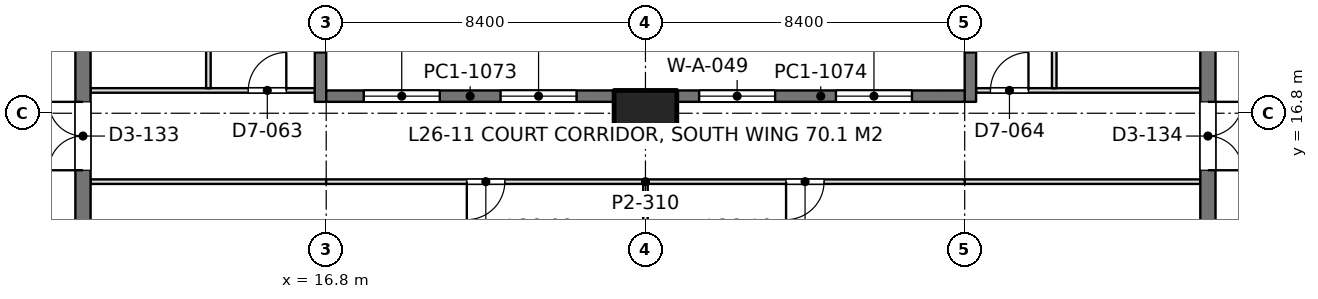
"""IFC4 building model, lengths in metres.
Left out: names, types, materials, properties, quantities, classifications, styles, units other than length and angle.
Written with IfcOpenShell. Run it as: python <this file> out.ifc"""

import sys

from ifc_helpers import new_model, si_unit, direction, frame, frame_2d, origin, origin_2d, place, context, subcontext, project, spatial, rectangle, extrude, element, fill, save


model = new_model("IFC4")
c1 = context("Model", 3, precision=1e-05, world=origin(), true_north=direction((0.0, 1.0)))
c2 = subcontext(c1, "Body", "Model", "MODEL_VIEW")
j1 = project(units=[si_unit("LENGTHUNIT", "METRE"), si_unit("PLANEANGLEUNIT", "RADIAN")], contexts=[c1])
p1 = place(None, origin())
s1 = spatial("IfcSite", under=j1, at=p1, CompositionType="ELEMENT")
p2 = place(p1, origin())
s2 = spatial("IfcBuilding", under=s1, at=p2, CompositionType="ELEMENT")
p3 = place(p2, frame((0.0, 0.0, 117.6)))
s3 = spatial("IfcBuildingStorey", under=s2, at=p3, CompositionType="ELEMENT", Elevation=117.6)
p4 = place(p3, frame((25.2, 16.8, 0.0), z_axis=(0.0, 0.0, 1.0), x_axis=(1.0, 0.0, 0.0)))
e1 = element("IfcColumn", 1, at=p4, inside=s3, PredefinedType="COLUMN", context=c2, shape_type="SweptSolid", body=[
    extrude(rectangle(XDim=1.65, YDim=1.2, at=origin_2d()), origin(), (0.0, 0.0, 1.0), 4.2),
])
p5 = place(p3, frame((10.4, 13.05, 0.0), z_axis=(0.0, 0.0, 1.0), x_axis=(0.0, 1.0, 0.0)))
e2 = element("IfcWall", 2, at=p5, inside=s3, PredefinedType="SHEAR", context=c2, shape_type="SweptSolid", body=[
    extrude(rectangle(XDim=24.3, YDim=0.4, at=frame_2d((12.15, 0.0))), origin(), (0.0, 0.0, 1.0), 4.2),
])
p6 = place(p5, frame((10.05, 0.0, 0.0)))
e3 = element("IfcOpeningElement", 3, at=p6, cuts=e2, PredefinedType="OPENING", context=c2, shape_type="SweptSolid", body=[
    extrude(rectangle(XDim=1.1, YDim=2.2, at=frame_2d((0.55, 1.1))), frame((0.0, 0.21, 0.0), z_axis=(0.0, -1.0, 0.0), x_axis=(1.0, 0.0, 0.0)), (0.0, 0.0, 1.0), 0.42),
])
p7 = place(p5, frame((12.9, 0.0, 0.0)))
e4 = element("IfcOpeningElement", 4, at=p7, cuts=e2, PredefinedType="OPENING", context=c2, shape_type="SweptSolid", body=[
    extrude(rectangle(XDim=1.1, YDim=2.2, at=frame_2d((0.55, 1.1))), frame((0.0, 0.21, 0.0), z_axis=(0.0, -1.0, 0.0), x_axis=(1.0, 0.0, 0.0)), (0.0, 0.0, 1.0), 0.42),
])
p8 = place(p5, frame((21.45, 0.0, 0.0)))
e5 = element("IfcOpeningElement", 5, at=p8, cuts=e2, PredefinedType="OPENING", context=c2, shape_type="SweptSolid", body=[
    extrude(rectangle(XDim=1.1, YDim=2.2, at=frame_2d((0.55, 1.1))), frame((0.0, 0.21, 0.0), z_axis=(0.0, -1.0, 0.0), x_axis=(1.0, 0.0, 0.0)), (0.0, 0.0, 1.0), 0.42),
])
p9 = place(p5, frame((2.25, 0.0, 0.0)))
e6 = element("IfcOpeningElement", 6, at=p9, cuts=e2, PredefinedType="OPENING", context=c2, shape_type="SweptSolid", body=[
    extrude(rectangle(XDim=1.8, YDim=2.4, at=frame_2d((0.9, 1.2))), frame((0.0, 0.21, 0.0), z_axis=(0.0, -1.0, 0.0), x_axis=(1.0, 0.0, 0.0)), (0.0, 0.0, 1.0), 0.42),
])
p10 = place(p5, frame((5.8, 0.0, 0.0)))
e7 = element("IfcOpeningElement", 7, at=p10, cuts=e2, PredefinedType="OPENING", context=c2, shape_type="SweptSolid", body=[
    extrude(rectangle(XDim=1.8, YDim=2.4, at=frame_2d((0.9, 1.2))), frame((0.0, 0.21, 0.0), z_axis=(0.0, -1.0, 0.0), x_axis=(1.0, 0.0, 0.0)), (0.0, 0.0, 1.0), 0.42),
])
p11 = place(p3, frame((40.0, 13.05, 0.0), z_axis=(0.0, 0.0, 1.0), x_axis=(0.0, 1.0, 0.0)))
e8 = element("IfcWall", 8, at=p11, inside=s3, PredefinedType="SHEAR", context=c2, shape_type="SweptSolid", body=[
    extrude(rectangle(XDim=24.3, YDim=0.4, at=frame_2d((12.15, 0.0))), origin(), (0.0, 0.0, 1.0), 4.2),
])
p12 = place(p11, frame((10.05, 0.0, 0.0)))
e9 = element("IfcOpeningElement", 9, at=p12, cuts=e8, PredefinedType="OPENING", context=c2, shape_type="SweptSolid", body=[
    extrude(rectangle(XDim=1.1, YDim=2.2, at=frame_2d((0.55, 1.1))), frame((0.0, 0.21, 0.0), z_axis=(0.0, -1.0, 0.0), x_axis=(1.0, 0.0, 0.0)), (0.0, 0.0, 1.0), 0.42),
])
p13 = place(p11, frame((12.9, 0.0, 0.0)))
e10 = element("IfcOpeningElement", 10, at=p13, cuts=e8, PredefinedType="OPENING", context=c2, shape_type="SweptSolid", body=[
    extrude(rectangle(XDim=1.1, YDim=2.2, at=frame_2d((0.55, 1.1))), frame((0.0, 0.21, 0.0), z_axis=(0.0, -1.0, 0.0), x_axis=(1.0, 0.0, 0.0)), (0.0, 0.0, 1.0), 0.42),
])
p14 = place(p11, frame((21.45, 0.0, 0.0)))
e11 = element("IfcOpeningElement", 11, at=p14, cuts=e8, PredefinedType="OPENING", context=c2, shape_type="SweptSolid", body=[
    extrude(rectangle(XDim=1.1, YDim=2.2, at=frame_2d((0.55, 1.1))), frame((0.0, 0.21, 0.0), z_axis=(0.0, -1.0, 0.0), x_axis=(1.0, 0.0, 0.0)), (0.0, 0.0, 1.0), 0.42),
])
p15 = place(p11, frame((2.25, 0.0, 0.0)))
e12 = element("IfcOpeningElement", 12, at=p15, cuts=e8, PredefinedType="OPENING", context=c2, shape_type="SweptSolid", body=[
    extrude(rectangle(XDim=1.8, YDim=2.4, at=frame_2d((0.9, 1.2))), frame((0.0, 0.21, 0.0), z_axis=(0.0, -1.0, 0.0), x_axis=(1.0, 0.0, 0.0)), (0.0, 0.0, 1.0), 0.42),
])
p16 = place(p11, frame((5.8, 0.0, 0.0)))
e13 = element("IfcOpeningElement", 13, at=p16, cuts=e8, PredefinedType="OPENING", context=c2, shape_type="SweptSolid", body=[
    extrude(rectangle(XDim=1.8, YDim=2.4, at=frame_2d((0.9, 1.2))), frame((0.0, 0.21, 0.0), z_axis=(0.0, -1.0, 0.0), x_axis=(1.0, 0.0, 0.0)), (0.0, 0.0, 1.0), 0.42),
])
p17 = place(p3, frame((16.65, 17.1, 0.0), z_axis=(0.0, 0.0, 1.0), x_axis=(0.0, 1.0, 0.0)))
e14 = element("IfcWall", 14, at=p17, inside=s3, PredefinedType="SOLIDWALL", context=c2, shape_type="SweptSolid", body=[
    extrude(rectangle(XDim=5.0, YDim=0.3, at=frame_2d((2.5, 0.0))), origin(), (0.0, 0.0, 1.0), 4.05),
])
p18 = place(p17, frame((1.3, 0.0, 0.1)))
e15 = element("IfcOpeningElement", 15, at=p18, cuts=e14, PredefinedType="OPENING", context=c2, shape_type="SweptSolid", body=[
    extrude(rectangle(XDim=2.0, YDim=3.0, at=frame_2d((1.0, 1.5))), frame((0.0, 0.16, 0.0), z_axis=(0.0, -1.0, 0.0), x_axis=(1.0, 0.0, 0.0)), (0.0, 0.0, 1.0), 0.32),
])
p19 = place(p3, frame((33.75, 17.1, 0.0), z_axis=(0.0, 0.0, 1.0), x_axis=(0.0, 1.0, 0.0)))
e16 = element("IfcWall", 16, at=p19, inside=s3, PredefinedType="SOLIDWALL", context=c2, shape_type="SweptSolid", body=[
    extrude(rectangle(XDim=5.0, YDim=0.3, at=frame_2d((2.5, 0.0))), origin(), (0.0, 0.0, 1.0), 4.05),
])
p20 = place(p19, frame((1.3, 0.0, 0.1)))
e17 = element("IfcOpeningElement", 17, at=p20, cuts=e16, PredefinedType="OPENING", context=c2, shape_type="SweptSolid", body=[
    extrude(rectangle(XDim=2.0, YDim=3.0, at=frame_2d((1.0, 1.5))), frame((0.0, 0.16, 0.0), z_axis=(0.0, -1.0, 0.0), x_axis=(1.0, 0.0, 0.0)), (0.0, 0.0, 1.0), 0.32),
])
p21 = place(p3, frame((16.8, 17.25, 0.0), z_axis=(0.0, 0.0, 1.0), x_axis=(1.0, 0.0, 0.0)))
e18 = element("IfcWall", 18, at=p21, inside=s3, PredefinedType="SOLIDWALL", context=c2, shape_type="SweptSolid", body=[
    extrude(rectangle(XDim=7.575, YDim=0.3, at=frame_2d((3.788, 0.0))), origin(), (0.0, 0.0, 1.0), 4.05),
])
p22 = place(p21, frame((0.988, 0.0, 0.1)))
e19 = element("IfcOpeningElement", 19, at=p22, cuts=e18, PredefinedType="OPENING", context=c2, shape_type="SweptSolid", body=[
    extrude(rectangle(XDim=2.0, YDim=3.0, at=frame_2d((1.0, 1.5))), frame((0.0, 0.16, 0.0), z_axis=(0.0, -1.0, 0.0), x_axis=(1.0, 0.0, 0.0)), (0.0, 0.0, 1.0), 0.32),
])
p23 = place(p21, frame((4.587, 0.0, 0.1)))
e20 = element("IfcOpeningElement", 20, at=p23, cuts=e18, PredefinedType="OPENING", context=c2, shape_type="SweptSolid", body=[
    extrude(rectangle(XDim=2.0, YDim=3.0, at=frame_2d((1.0, 1.5))), frame((0.0, 0.16, 0.0), z_axis=(0.0, -1.0, 0.0), x_axis=(1.0, 0.0, 0.0)), (0.0, 0.0, 1.0), 0.32),
])
p24 = place(p3, frame((26.025, 17.25, 0.0), z_axis=(0.0, 0.0, 1.0), x_axis=(1.0, 0.0, 0.0)))
e21 = element("IfcWall", 21, at=p24, inside=s3, PredefinedType="SOLIDWALL", context=c2, shape_type="SweptSolid", body=[
    extrude(rectangle(XDim=7.575, YDim=0.3, at=frame_2d((3.788, 0.0))), origin(), (0.0, 0.0, 1.0), 4.05),
])
p25 = place(p24, frame((0.587, 0.0, 0.1)))
e22 = element("IfcOpeningElement", 22, at=p25, cuts=e21, PredefinedType="OPENING", context=c2, shape_type="SweptSolid", body=[
    extrude(rectangle(XDim=2.0, YDim=3.0, at=frame_2d((1.0, 1.5))), frame((0.0, 0.16, 0.0), z_axis=(0.0, -1.0, 0.0), x_axis=(1.0, 0.0, 0.0)), (0.0, 0.0, 1.0), 0.32),
])
p26 = place(p24, frame((4.188, 0.0, 0.1)))
e23 = element("IfcOpeningElement", 23, at=p26, cuts=e21, PredefinedType="OPENING", context=c2, shape_type="SweptSolid", body=[
    extrude(rectangle(XDim=2.0, YDim=3.0, at=frame_2d((1.0, 1.5))), frame((0.0, 0.16, 0.0), z_axis=(0.0, -1.0, 0.0), x_axis=(1.0, 0.0, 0.0)), (0.0, 0.0, 1.0), 0.32),
])
p27 = place(p3, frame((10.598, 17.4, 0.0), z_axis=(0.0, 0.0, 1.0), x_axis=(1.0, 0.0, 0.0)))
e24 = element("IfcWall", 24, at=p27, inside=s3, PredefinedType="PARTITIONING", context=c2, shape_type="SweptSolid", body=[
    extrude(rectangle(XDim=5.904, YDim=0.12, at=frame_2d((2.952, 0.0))), origin(), (0.0, 0.0, 1.0), 3.55),
])
p28 = place(p27, frame((4.152, 0.0, 0.0)))
e25 = element("IfcOpeningElement", 25, at=p28, cuts=e24, PredefinedType="OPENING", context=c2, shape_type="SweptSolid", body=[
    extrude(rectangle(XDim=1.0, YDim=2.4, at=frame_2d((0.5, 1.2))), frame((0.0, 0.07, 0.0), z_axis=(0.0, -1.0, 0.0), x_axis=(1.0, 0.0, 0.0)), (0.0, 0.0, 1.0), 0.14),
])
p29 = place(p3, frame((13.7, 17.458, 0.0), z_axis=(0.0, 0.0, 1.0), x_axis=(0.0, 1.0, 0.0)))
e26 = element("IfcWall", 26, at=p29, inside=s3, PredefinedType="PARTITIONING", context=c2, shape_type="SweptSolid", body=[
    extrude(rectangle(XDim=4.644, YDim=0.12, at=frame_2d((2.322, 0.0))), origin(), (0.0, 0.0, 1.0), 3.6),
])
p30 = place(p3, frame((33.898, 17.4, 0.0), z_axis=(0.0, 0.0, 1.0), x_axis=(1.0, 0.0, 0.0)))
e27 = element("IfcWall", 27, at=p30, inside=s3, PredefinedType="PARTITIONING", context=c2, shape_type="SweptSolid", body=[
    extrude(rectangle(XDim=5.904, YDim=0.12, at=frame_2d((2.952, 0.0))), origin(), (0.0, 0.0, 1.0), 3.55),
])
p31 = place(p30, frame((0.38, 0.0, 0.0)))
e28 = element("IfcOpeningElement", 28, at=p31, cuts=e27, PredefinedType="OPENING", context=c2, shape_type="SweptSolid", body=[
    extrude(rectangle(XDim=1.0, YDim=2.4, at=frame_2d((0.5, 1.2))), frame((0.0, 0.07, 0.0), z_axis=(0.0, -1.0, 0.0), x_axis=(1.0, 0.0, 0.0)), (0.0, 0.0, 1.0), 0.14),
])
p32 = place(p3, frame((35.956, 17.458, 0.0), z_axis=(0.0, 0.0, 1.0), x_axis=(0.0, 1.0, 0.0)))
e29 = element("IfcWall", 29, at=p32, inside=s3, PredefinedType="PARTITIONING", context=c2, shape_type="SweptSolid", body=[
    extrude(rectangle(XDim=4.644, YDim=0.12, at=frame_2d((2.322, 0.0))), origin(), (0.0, 0.0, 1.0), 3.6),
])
for number, where, z_axis, x_axis in (
    (30, (10.598, 15.0, 0.0), (0.0, 0.0, 1.0), (1.0, 0.0, 0.0)),
    (31, (33.598, 15.0, 0.0), (0.0, 0.0, 1.0), (1.0, 0.0, 0.0)),
):
    element("IfcWall", number, at=place(p3, frame(where, z_axis=z_axis, x_axis=x_axis)), inside=s3, PredefinedType="PARTITIONING", context=c2, shape_type="SweptSolid", body=[
        extrude(rectangle(XDim=6.204, YDim=0.12, at=frame_2d((3.102, 0.0))), origin(), (0.0, 0.0, 1.0), 3.55),
    ])
p33 = place(p3, frame((25.2, 12.658, 0.0), z_axis=(0.0, 0.0, 1.0), x_axis=(0.0, 1.0, 0.0)))
e32 = element("IfcWall", 32, at=p33, inside=s3, PredefinedType="PARTITIONING", context=c2, shape_type="SweptSolid", body=[
    extrude(rectangle(XDim=2.284, YDim=0.12, at=frame_2d((1.142, 0.0))), origin(), (0.0, 0.0, 1.0), 3.55),
])
p34 = place(p3, frame((16.798, 15.0, 0.0), z_axis=(0.0, 0.0, 1.0), x_axis=(1.0, 0.0, 0.0)))
e33 = element("IfcWall", 33, at=p34, inside=s3, PredefinedType="PARTITIONING", context=c2, shape_type="SweptSolid", body=[
    extrude(rectangle(XDim=16.804, YDim=0.12, at=frame_2d((8.402, 0.0))), origin(), (0.0, 0.0, 1.0), 3.55),
])
p35 = place(p34, frame((3.702, 0.0, 0.0)))
e34 = element("IfcOpeningElement", 34, at=p35, cuts=e33, PredefinedType="OPENING", context=c2, shape_type="SweptSolid", body=[
    extrude(rectangle(XDim=1.0, YDim=2.4, at=frame_2d((0.5, 1.2))), frame((0.0, 0.07, 0.0), z_axis=(0.0, -1.0, 0.0), x_axis=(1.0, 0.0, 0.0)), (0.0, 0.0, 1.0), 0.14),
])
p36 = place(p34, frame((12.102, 0.0, 0.0)))
e35 = element("IfcOpeningElement", 35, at=p36, cuts=e33, PredefinedType="OPENING", context=c2, shape_type="SweptSolid", body=[
    extrude(rectangle(XDim=1.0, YDim=2.4, at=frame_2d((0.5, 1.2))), frame((0.0, 0.07, 0.0), z_axis=(0.0, -1.0, 0.0), x_axis=(1.0, 0.0, 0.0)), (0.0, 0.0, 1.0), 0.14),
])
p37 = place(p22, origin())
e36 = element("IfcWindow", 36, at=p37, inside=s3, PartitioningType="SINGLE_PANEL", PredefinedType="WINDOW", context=c2, shape_type="SweptSolid", body=[
    extrude(rectangle(XDim=2.0, YDim=3.0, at=frame_2d((1.0, 1.5))), frame((0.0, 0.03, 0.0), z_axis=(0.0, -1.0, 0.0), x_axis=(1.0, 0.0, 0.0)), (0.0, 0.0, 1.0), 0.06),
])
fill(e19, e36)
p38 = place(p23, origin())
e37 = element("IfcWindow", 37, at=p38, inside=s3, PartitioningType="SINGLE_PANEL", PredefinedType="WINDOW", context=c2, shape_type="SweptSolid", body=[
    extrude(rectangle(XDim=2.0, YDim=3.0, at=frame_2d((1.0, 1.5))), frame((0.0, 0.03, 0.0), z_axis=(0.0, -1.0, 0.0), x_axis=(1.0, 0.0, 0.0)), (0.0, 0.0, 1.0), 0.06),
])
fill(e20, e37)
p39 = place(p25, origin())
e38 = element("IfcWindow", 38, at=p39, inside=s3, PartitioningType="SINGLE_PANEL", PredefinedType="WINDOW", context=c2, shape_type="SweptSolid", body=[
    extrude(rectangle(XDim=2.0, YDim=3.0, at=frame_2d((1.0, 1.5))), frame((0.0, 0.03, 0.0), z_axis=(0.0, -1.0, 0.0), x_axis=(1.0, 0.0, 0.0)), (0.0, 0.0, 1.0), 0.06),
])
fill(e22, e38)
p40 = place(p26, origin())
e39 = element("IfcWindow", 39, at=p40, inside=s3, PartitioningType="SINGLE_PANEL", PredefinedType="WINDOW", context=c2, shape_type="SweptSolid", body=[
    extrude(rectangle(XDim=2.0, YDim=3.0, at=frame_2d((1.0, 1.5))), frame((0.0, 0.03, 0.0), z_axis=(0.0, -1.0, 0.0), x_axis=(1.0, 0.0, 0.0)), (0.0, 0.0, 1.0), 0.06),
])
fill(e23, e39)
p41 = place(p9, origin())
e40 = element("IfcDoor", 40, at=p41, inside=s3, OperationType="DOUBLE_DOOR_SINGLE_SWING", PredefinedType="DOOR", context=c2, shape_type="SweptSolid", body=[
    extrude(rectangle(XDim=1.8, YDim=2.4, at=frame_2d((0.9, 1.2))), frame((0.0, 0.025, 0.0), z_axis=(0.0, -1.0, 0.0), x_axis=(1.0, 0.0, 0.0)), (0.0, 0.0, 1.0), 0.05),
])
fill(e6, e40)
p42 = place(p15, frame((1.8, 0.0, 0.0), z_axis=(0.0, 0.0, 1.0), x_axis=(-1.0, 0.0, 0.0)))
e41 = element("IfcDoor", 41, at=p42, inside=s3, OperationType="DOUBLE_DOOR_SINGLE_SWING", PredefinedType="DOOR", context=c2, shape_type="SweptSolid", body=[
    extrude(rectangle(XDim=1.8, YDim=2.4, at=frame_2d((0.9, 1.2))), frame((0.0, 0.025, 0.0), z_axis=(0.0, -1.0, 0.0), x_axis=(1.0, 0.0, 0.0)), (0.0, 0.0, 1.0), 0.05),
])
fill(e12, e41)
p43 = place(p28, origin())
e42 = element("IfcDoor", 42, at=p43, inside=s3, OperationType="SINGLE_SWING_RIGHT", PredefinedType="DOOR", context=c2, shape_type="SweptSolid", body=[
    extrude(rectangle(XDim=1.0, YDim=2.4, at=frame_2d((0.5, 1.2))), frame((0.0, 0.025, 0.0), z_axis=(0.0, -1.0, 0.0), x_axis=(1.0, 0.0, 0.0)), (0.0, 0.0, 1.0), 0.05),
])
fill(e25, e42)
p44 = place(p31, origin())
e43 = element("IfcDoor", 43, at=p44, inside=s3, OperationType="SINGLE_SWING_RIGHT", PredefinedType="DOOR", context=c2, shape_type="SweptSolid", body=[
    extrude(rectangle(XDim=1.0, YDim=2.4, at=frame_2d((0.5, 1.2))), frame((0.0, 0.025, 0.0), z_axis=(0.0, -1.0, 0.0), x_axis=(1.0, 0.0, 0.0)), (0.0, 0.0, 1.0), 0.05),
])
fill(e28, e43)
p45 = place(p35, frame((1.0, 0.0, 0.0), z_axis=(0.0, 0.0, 1.0), x_axis=(-1.0, 0.0, 0.0)))
e44 = element("IfcDoor", 44, at=p45, inside=s3, OperationType="SINGLE_SWING_RIGHT", PredefinedType="DOOR", context=c2, shape_type="SweptSolid", body=[
    extrude(rectangle(XDim=1.0, YDim=2.4, at=frame_2d((0.5, 1.2))), frame((0.0, 0.025, 0.0), z_axis=(0.0, -1.0, 0.0), x_axis=(1.0, 0.0, 0.0)), (0.0, 0.0, 1.0), 0.05),
])
fill(e34, e44)
p46 = place(p36, frame((1.0, 0.0, 0.0), z_axis=(0.0, 0.0, 1.0), x_axis=(-1.0, 0.0, 0.0)))
e45 = element("IfcDoor", 45, at=p46, inside=s3, OperationType="SINGLE_SWING_RIGHT", PredefinedType="DOOR", context=c2, shape_type="SweptSolid", body=[
    extrude(rectangle(XDim=1.0, YDim=2.4, at=frame_2d((0.5, 1.2))), frame((0.0, 0.025, 0.0), z_axis=(0.0, -1.0, 0.0), x_axis=(1.0, 0.0, 0.0)), (0.0, 0.0, 1.0), 0.05),
])
fill(e35, e45)
save(model, sys.argv[1])
